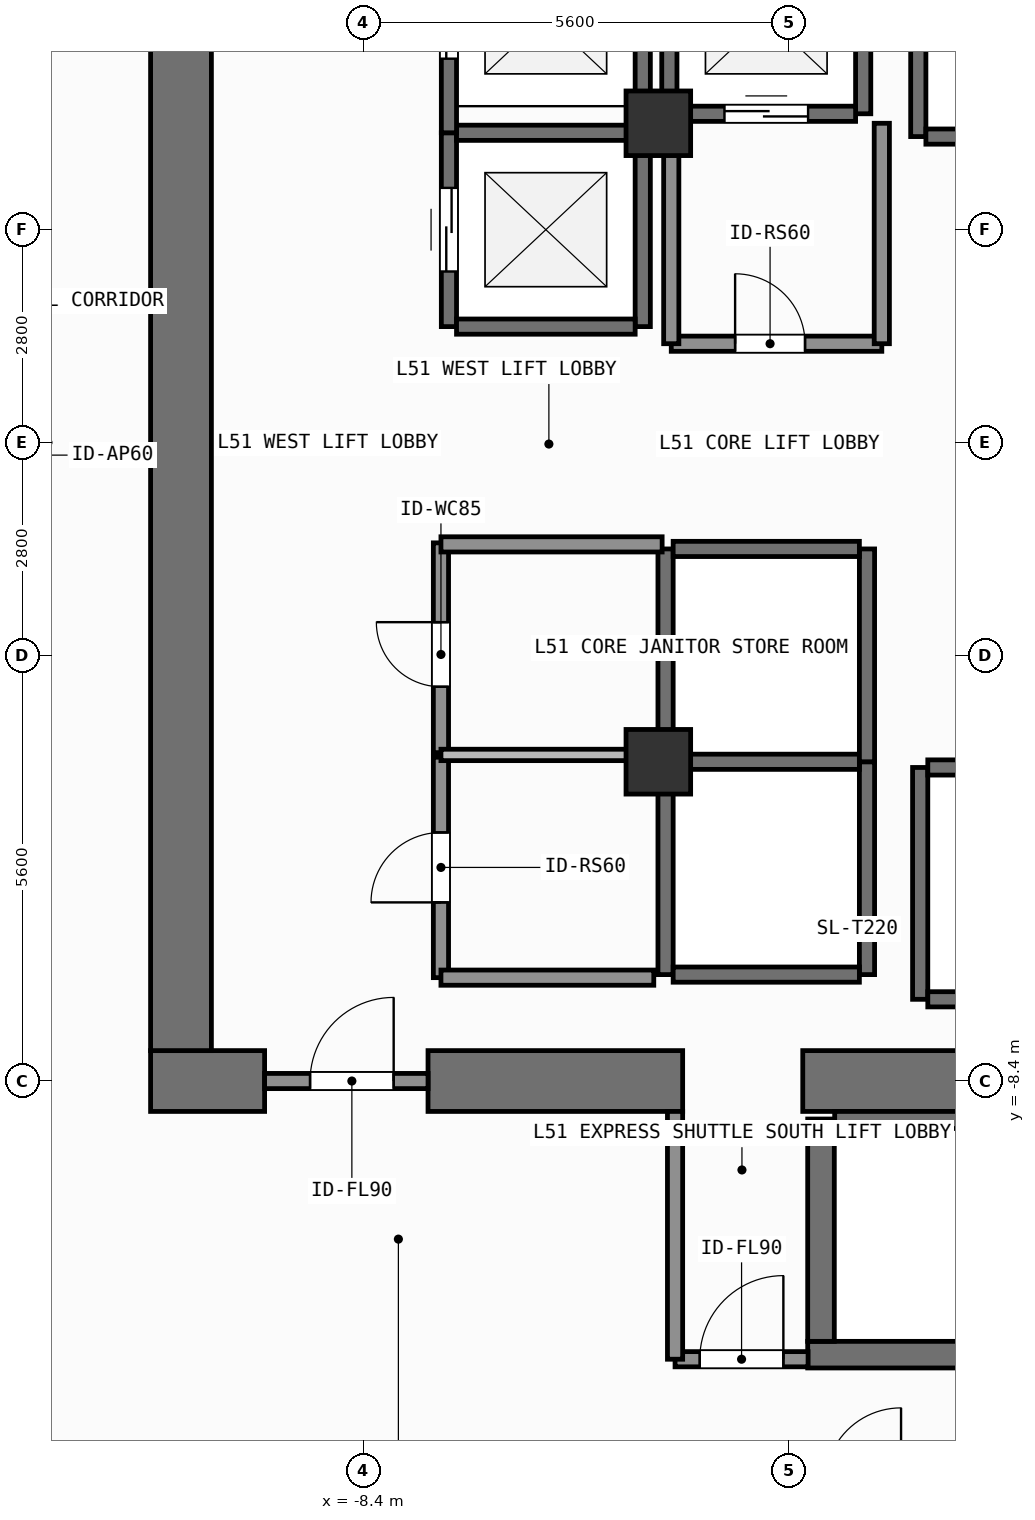
"""IFC4 building model, lengths in metres.
Left out: names, types, materials, properties, quantities, classifications, styles, units other than length and angle.
Written with IfcOpenShell. Run it as: python <this file> out.ifc"""

import sys

from ifc_helpers import new_model, si_unit, direction, frame, frame_2d, origin, origin_2d, place, context, subcontext, project, spatial, rectangle, extrude, element, fill, save


model = new_model("IFC4")
c1 = context("Model", 3, precision=1e-05, world=origin(), true_north=direction((0.0, 1.0)))
c2 = subcontext(c1, "Body", "Model", "MODEL_VIEW")
j1 = project(units=[si_unit("LENGTHUNIT", "METRE"), si_unit("PLANEANGLEUNIT", "RADIAN")], contexts=[c1])
p1 = place(None, origin())
s1 = spatial("IfcSite", under=j1, at=p1, CompositionType="ELEMENT")
p2 = place(p1, origin())
s2 = spatial("IfcBuilding", under=s1, at=p2, CompositionType="ELEMENT")
p3 = place(p2, frame((0.0, 0.0, 207.0)))
s3 = spatial("IfcBuildingStorey", under=s2, at=p3, CompositionType="ELEMENT", Elevation=207.0)
p4 = place(p3, frame((-11.2, -8.4, 0.0), z_axis=(0.0, 0.0, 1.0), x_axis=(1.0, 0.0, 0.0)))
e1 = element("IfcWall", 1, at=p4, inside=s3, PredefinedType="SHEAR", context=c2, shape_type="SweptSolid", body=[
    extrude(rectangle(XDim=1.5, YDim=0.8, at=frame_2d((0.75, 0.0))), origin(), (0.0, 0.0, 1.0), 3.9),
])
p5 = place(p3, frame((-7.55, -8.4, 0.0), z_axis=(0.0, 0.0, 1.0), x_axis=(1.0, 0.0, 0.0)))
e2 = element("IfcWall", 2, at=p5, inside=s3, PredefinedType="SHEAR", context=c2, shape_type="SweptSolid", body=[
    extrude(rectangle(XDim=3.35, YDim=0.8, at=frame_2d((1.675, 0.0))), origin(), (0.0, 0.0, 1.0), 3.9),
])
p6 = place(p3, frame((-2.62, -8.4, 0.0), z_axis=(0.0, 0.0, 1.0), x_axis=(1.0, 0.0, 0.0)))
e3 = element("IfcWall", 3, at=p6, inside=s3, PredefinedType="SHEAR", context=c2, shape_type="SweptSolid", body=[
    extrude(rectangle(XDim=7.27, YDim=0.8, at=frame_2d((3.635, 0.0))), origin(), (0.0, 0.0, 1.0), 3.9),
])
p7 = place(p3, frame((-10.8, -8.0, 0.0), z_axis=(0.0, 0.0, 1.0), x_axis=(0.0, 1.0, 0.0)))
e4 = element("IfcWall", 4, at=p7, inside=s3, PredefinedType="SHEAR", context=c2, shape_type="SweptSolid", body=[
    extrude(rectangle(XDim=16.0, YDim=0.8, at=frame_2d((8.0, 0.0))), origin(), (0.0, 0.0, 1.0), 3.9),
])
p8 = place(p3, frame((-2.555, -12.0, 0.0), z_axis=(0.0, 0.0, 1.0), x_axis=(1.0, 0.0, 0.0)))
e5 = element("IfcWall", 5, at=p8, inside=s3, PredefinedType="SHEAR", context=c2, shape_type="SweptSolid", body=[
    extrude(rectangle(XDim=7.31, YDim=0.35, at=frame_2d((3.655, 0.0))), origin(), (0.0, 0.0, 1.0), 3.9),
])
p9 = place(p3, frame((-2.2, -8.913, 0.0), z_axis=(0.0, 0.0, 1.0), x_axis=(1.0, 0.0, 0.0)))
e6 = element("IfcWall", 6, at=p9, inside=s3, PredefinedType="SHEAR", context=c2, shape_type="SweptSolid", body=[
    extrude(rectangle(XDim=6.6, YDim=0.225, at=frame_2d((3.3, 0.0))), origin(), (0.0, 0.0, 1.0), 3.9),
])
p10 = place(p3, frame((-2.38, -11.825, 0.0), z_axis=(0.0, 0.0, 1.0), x_axis=(0.0, 1.0, 0.0)))
e7 = element("IfcWall", 7, at=p10, inside=s3, PredefinedType="SHEAR", context=c2, shape_type="SweptSolid", body=[
    extrude(rectangle(XDim=2.925, YDim=0.35, at=frame_2d((1.462, 0.0))), origin(), (0.0, 0.0, 1.0), 3.9),
])
for number, where, z_axis, x_axis in (
    (8, (-4.52, -4.2, 0.0), (0.0, 0.0, 1.0), (1.0, 0.0, 0.0)),
    (9, (-4.52, 4.2, 0.0), (0.0, 0.0, 1.0), (1.0, 0.0, 0.0)),
):
    element("IfcColumn", number, at=place(p3, frame(where, z_axis=z_axis, x_axis=x_axis)), inside=s3, PredefinedType="COLUMN", context=c2, shape_type="SweptSolid", body=[
        extrude(rectangle(XDim=0.85, YDim=0.85, at=origin_2d()), origin(), (0.0, 0.0, 1.0), 3.9),
    ])
p11 = place(p3, frame((-7.275, 1.525, 0.0), z_axis=(0.0, 0.0, 1.0), x_axis=(0.0, 1.0, 0.0)))
e10 = element("IfcWall", 10, at=p11, inside=s3, PredefinedType="SHEAR", context=c2, shape_type="SweptSolid", body=[
    extrude(rectangle(XDim=2.55, YDim=0.2, at=frame_2d((1.275, 0.0))), origin(), (0.0, 0.0, 1.0), 3.62),
])
p12 = place(p11, frame((0.725, 0.0, 0.0)))
e11 = element("IfcOpeningElement", 11, at=p12, cuts=e10, PredefinedType="OPENING", context=c2, shape_type="SweptSolid", body=[
    extrude(rectangle(XDim=1.1, YDim=2.2, at=frame_2d((0.55, 1.1))), frame((0.0, 0.11, 0.0), z_axis=(0.0, -1.0, 0.0), x_axis=(1.0, 0.0, 0.0)), (0.0, 0.0, 1.0), 0.22),
])
p13 = place(p3, frame((-4.725, 1.525, 0.0), z_axis=(0.0, 0.0, 1.0), x_axis=(0.0, 1.0, 0.0)))
e12 = element("IfcWall", 12, at=p13, inside=s3, PredefinedType="SHEAR", context=c2, shape_type="SweptSolid", body=[
    extrude(rectangle(XDim=2.55, YDim=0.2, at=frame_2d((1.275, 0.0))), origin(), (0.0, 0.0, 1.0), 3.62),
])
for number, where, z_axis, x_axis in (
    (13, (-7.175, 1.525, 0.0), (0.0, 0.0, 1.0), (1.0, 0.0, 0.0)),
    (14, (-7.175, 4.075, 0.0), (0.0, 0.0, 1.0), (1.0, 0.0, 0.0)),
):
    element("IfcWall", number, at=place(p3, frame(where, z_axis=z_axis, x_axis=x_axis)), inside=s3, PredefinedType="SHEAR", context=c2, shape_type="SweptSolid", body=[
        extrude(rectangle(XDim=2.35, YDim=0.2, at=frame_2d((1.175, 0.0))), origin(), (0.0, 0.0, 1.0), 3.62),
    ])
p14 = place(p3, frame((-7.275, 4.075, 0.0), z_axis=(0.0, 0.0, 1.0), x_axis=(0.0, 1.0, 0.0)))
e15 = element("IfcWall", 15, at=p14, inside=s3, PredefinedType="SHEAR", context=c2, shape_type="SweptSolid", body=[
    extrude(rectangle(XDim=2.8, YDim=0.2, at=frame_2d((1.4, 0.0))), origin(), (0.0, 0.0, 1.0), 3.62),
])
p15 = place(p14, frame((0.975, 0.0, 0.0)))
e16 = element("IfcOpeningElement", 16, at=p15, cuts=e15, PredefinedType="OPENING", context=c2, shape_type="SweptSolid", body=[
    extrude(rectangle(XDim=1.1, YDim=2.2, at=frame_2d((0.55, 1.1))), frame((0.0, 0.11, 0.0), z_axis=(0.0, -1.0, 0.0), x_axis=(1.0, 0.0, 0.0)), (0.0, 0.0, 1.0), 0.22),
])
p16 = place(p3, frame((-4.725, 4.075, 0.0), z_axis=(0.0, 0.0, 1.0), x_axis=(0.0, 1.0, 0.0)))
e17 = element("IfcWall", 17, at=p16, inside=s3, PredefinedType="SHEAR", context=c2, shape_type="SweptSolid", body=[
    extrude(rectangle(XDim=2.8, YDim=0.2, at=frame_2d((1.4, 0.0))), origin(), (0.0, 0.0, 1.0), 3.62),
])
for number, where, z_axis, x_axis in (
    (18, (-4.375, 4.325, 0.0), (0.0, 0.0, 1.0), (0.0, 1.0, 0.0)),
    (19, (-1.825, 4.325, 0.0), (0.0, 0.0, 1.0), (0.0, 1.0, 0.0)),
):
    element("IfcWall", number, at=place(p3, frame(where, z_axis=z_axis, x_axis=x_axis)), inside=s3, PredefinedType="SHEAR", context=c2, shape_type="SweptSolid", body=[
        extrude(rectangle(XDim=2.55, YDim=0.2, at=frame_2d((1.275, 0.0))), origin(), (0.0, 0.0, 1.0), 3.62),
    ])
p17 = place(p3, frame((-4.275, 4.325, 0.0), z_axis=(0.0, 0.0, 1.0), x_axis=(1.0, 0.0, 0.0)))
e20 = element("IfcWall", 20, at=p17, inside=s3, PredefinedType="SHEAR", context=c2, shape_type="SweptSolid", body=[
    extrude(rectangle(XDim=2.35, YDim=0.2, at=frame_2d((1.175, 0.0))), origin(), (0.0, 0.0, 1.0), 3.62),
])
p18 = place(p17, frame((0.625, 0.0, 0.0)))
e21 = element("IfcOpeningElement", 21, at=p18, cuts=e20, PredefinedType="OPENING", context=c2, shape_type="SweptSolid", body=[
    extrude(rectangle(XDim=1.1, YDim=2.2, at=frame_2d((0.55, 1.1))), frame((0.0, 0.11, 0.0), z_axis=(0.0, -1.0, 0.0), x_axis=(1.0, 0.0, 0.0)), (0.0, 0.0, 1.0), 0.22),
])
for number, where, z_axis, x_axis in (
    (22, (-4.425, -7.0, 0.0), (0.0, 0.0, 1.0), (0.0, 1.0, 0.0)),
    (23, (-1.775, -7.0, 0.0), (0.0, 0.0, 1.0), (0.0, 1.0, 0.0)),
):
    element("IfcWall", number, at=place(p3, frame(where, z_axis=z_axis, x_axis=x_axis)), inside=s3, PredefinedType="SHEAR", context=c2, shape_type="SweptSolid", body=[
        extrude(rectangle(XDim=2.8, YDim=0.2, at=frame_2d((1.4, 0.0))), origin(), (0.0, 0.0, 1.0), 3.62),
    ])
for number, where, z_axis, x_axis in (
    (24, (-4.325, -7.0, 0.0), (0.0, 0.0, 1.0), (1.0, 0.0, 0.0)),
    (25, (-4.325, -4.2, 0.0), (0.0, 0.0, 1.0), (1.0, 0.0, 0.0)),
):
    element("IfcWall", number, at=place(p3, frame(where, z_axis=z_axis, x_axis=x_axis)), inside=s3, PredefinedType="SHEAR", context=c2, shape_type="SweptSolid", body=[
        extrude(rectangle(XDim=2.45, YDim=0.2, at=frame_2d((1.225, 0.0))), origin(), (0.0, 0.0, 1.0), 3.62),
    ])
for number, where, z_axis, x_axis in (
    (26, (-4.425, -4.2, 0.0), (0.0, 0.0, 1.0), (0.0, 1.0, 0.0)),
    (27, (-1.775, -4.2, 0.0), (0.0, 0.0, 1.0), (0.0, 1.0, 0.0)),
):
    element("IfcWall", number, at=place(p3, frame(where, z_axis=z_axis, x_axis=x_axis)), inside=s3, PredefinedType="SHEAR", context=c2, shape_type="SweptSolid", body=[
        extrude(rectangle(XDim=2.8, YDim=0.2, at=frame_2d((1.4, 0.0))), origin(), (0.0, 0.0, 1.0), 3.62),
    ])
p19 = place(p3, frame((-4.325, -1.4, 0.0), z_axis=(0.0, 0.0, 1.0), x_axis=(1.0, 0.0, 0.0)))
e28 = element("IfcWall", 28, at=p19, inside=s3, PredefinedType="SHEAR", context=c2, shape_type="SweptSolid", body=[
    extrude(rectangle(XDim=2.45, YDim=0.2, at=frame_2d((1.225, 0.0))), origin(), (0.0, 0.0, 1.0), 3.62),
])
p20 = place(p3, frame((-1.1, 4.025, 0.0), z_axis=(0.0, 0.0, 1.0), x_axis=(0.0, 1.0, 0.0)))
e29 = element("IfcWall", 29, at=p20, inside=s3, PredefinedType="SHEAR", context=c2, shape_type="SweptSolid", body=[
    extrude(rectangle(XDim=3.15, YDim=0.2, at=frame_2d((1.575, 0.0))), origin(), (0.0, 0.0, 1.0), 3.62),
])
p21 = place(p3, frame((-1.0, 4.025, 0.0), z_axis=(0.0, 0.0, 1.0), x_axis=(1.0, 0.0, 0.0)))
e30 = element("IfcWall", 30, at=p21, inside=s3, PredefinedType="SHEAR", context=c2, shape_type="SweptSolid", body=[
    extrude(rectangle(XDim=2.4, YDim=0.2, at=frame_2d((1.2, 0.0))), origin(), (0.0, 0.0, 1.0), 3.62),
])
p22 = place(p3, frame((-1.075, -7.325, 0.0), z_axis=(0.0, 0.0, 1.0), x_axis=(0.0, 1.0, 0.0)))
e31 = element("IfcWall", 31, at=p22, inside=s3, PredefinedType="SHEAR", context=c2, shape_type="SweptSolid", body=[
    extrude(rectangle(XDim=3.05, YDim=0.2, at=frame_2d((1.525, 0.0))), origin(), (0.0, 0.0, 1.0), 3.62),
])
for number, where, z_axis, x_axis in (
    (32, (-0.975, -7.325, 0.0), (0.0, 0.0, 1.0), (1.0, 0.0, 0.0)),
    (33, (-0.975, -4.275, 0.0), (0.0, 0.0, 1.0), (1.0, 0.0, 0.0)),
):
    element("IfcWall", number, at=place(p3, frame(where, z_axis=z_axis, x_axis=x_axis)), inside=s3, PredefinedType="SHEAR", context=c2, shape_type="SweptSolid", body=[
        extrude(rectangle(XDim=2.35, YDim=0.2, at=frame_2d((1.175, 0.0))), origin(), (0.0, 0.0, 1.0), 3.62),
    ])
p23 = place(p3, frame((-9.7, -8.4, 0.0), z_axis=(0.0, 0.0, 1.0), x_axis=(1.0, 0.0, 0.0)))
e34 = element("IfcWall", 34, at=p23, inside=s3, PredefinedType="SOLIDWALL", context=c2, shape_type="SweptSolid", body=[
    extrude(rectangle(XDim=2.15, YDim=0.2, at=frame_2d((1.075, 0.0))), origin(), (0.0, 0.0, 1.0), 2.76),
])
p24 = place(p23, frame((0.598, 0.0, 0.0)))
e35 = element("IfcOpeningElement", 35, at=p24, cuts=e34, PredefinedType="OPENING", context=c2, shape_type="SweptSolid", body=[
    extrude(rectangle(XDim=1.1, YDim=2.15, at=frame_2d((0.55, 1.075))), frame((0.0, 0.11, 0.0), z_axis=(0.0, -1.0, 0.0), x_axis=(1.0, 0.0, 0.0)), (0.0, 0.0, 1.0), 0.22),
])
p25 = place(p3, frame((-4.3, -12.06, 0.0), z_axis=(0.0, 0.0, 1.0), x_axis=(1.0, 0.0, 0.0)))
e36 = element("IfcWall", 36, at=p25, inside=s3, PredefinedType="SOLIDWALL", context=c2, shape_type="SweptSolid", body=[
    extrude(rectangle(XDim=1.75, YDim=0.2, at=frame_2d((0.875, 0.0))), origin(), (0.0, 0.0, 1.0), 3.62),
])
p26 = place(p25, frame((0.325, 0.0, 0.0)))
e37 = element("IfcOpeningElement", 37, at=p26, cuts=e36, PredefinedType="OPENING", context=c2, shape_type="SweptSolid", body=[
    extrude(rectangle(XDim=1.1, YDim=2.15, at=frame_2d((0.55, 1.075))), frame((0.0, 0.11, 0.0), z_axis=(0.0, -1.0, 0.0), x_axis=(1.0, 0.0, 0.0)), (0.0, 0.0, 1.0), 0.22),
])
p27 = place(p3, frame((-7.38, -7.04, 0.0), z_axis=(0.0, 0.0, 1.0), x_axis=(0.0, 1.0, 0.0)))
e38 = element("IfcWall", 38, at=p27, inside=s3, PredefinedType="SOLIDWALL", context=c2, shape_type="SweptSolid", body=[
    extrude(rectangle(XDim=2.9, YDim=0.2, at=frame_2d((1.45, 0.0))), origin(), (0.0, 0.0, 1.0), 3.62),
])
p28 = place(p27, frame((0.99, 0.0, 0.0)))
e39 = element("IfcOpeningElement", 39, at=p28, cuts=e38, PredefinedType="OPENING", context=c2, shape_type="SweptSolid", body=[
    extrude(rectangle(XDim=0.92, YDim=2.1, at=frame_2d((0.46, 1.05))), frame((0.0, 0.11, 0.0), z_axis=(0.0, -1.0, 0.0), x_axis=(1.0, 0.0, 0.0)), (0.0, 0.0, 1.0), 0.22),
])
p29 = place(p3, frame((-7.38, -4.08, 0.0), z_axis=(0.0, 0.0, 1.0), x_axis=(0.0, 1.0, 0.0)))
e40 = element("IfcWall", 40, at=p29, inside=s3, PredefinedType="SOLIDWALL", context=c2, shape_type="SweptSolid", body=[
    extrude(rectangle(XDim=2.76, YDim=0.2, at=frame_2d((1.38, 0.0))), origin(), (0.0, 0.0, 1.0), 3.62),
])
p30 = place(p29, frame((0.867, 0.0, 0.0)))
e41 = element("IfcOpeningElement", 41, at=p30, cuts=e40, PredefinedType="OPENING", context=c2, shape_type="SweptSolid", body=[
    extrude(rectangle(XDim=0.85, YDim=2.1, at=frame_2d((0.425, 1.05))), frame((0.0, 0.11, 0.0), z_axis=(0.0, -1.0, 0.0), x_axis=(1.0, 0.0, 0.0)), (0.0, 0.0, 1.0), 0.22),
])
p31 = place(p3, frame((-4.35, 1.3, 0.0), z_axis=(0.0, 0.0, 1.0), x_axis=(1.0, 0.0, 0.0)))
e42 = element("IfcWall", 42, at=p31, inside=s3, PredefinedType="SOLIDWALL", context=c2, shape_type="SweptSolid", body=[
    extrude(rectangle(XDim=2.77, YDim=0.2, at=frame_2d((1.385, 0.0))), origin(), (0.0, 0.0, 1.0), 3.62),
])
p32 = place(p31, frame((0.84, 0.0, 0.0)))
e43 = element("IfcOpeningElement", 43, at=p32, cuts=e42, PredefinedType="OPENING", context=c2, shape_type="SweptSolid", body=[
    extrude(rectangle(XDim=0.92, YDim=2.1, at=frame_2d((0.46, 1.05))), frame((0.0, 0.11, 0.0), z_axis=(0.0, -1.0, 0.0), x_axis=(1.0, 0.0, 0.0)), (0.0, 0.0, 1.0), 0.22),
])
p33 = place(p3, frame((-4.3, -12.06, 0.0), z_axis=(0.0, 0.0, 1.0), x_axis=(0.0, 1.0, 0.0)))
e44 = element("IfcWall", 44, at=p33, inside=s3, PredefinedType="SOLIDWALL", context=c2, shape_type="SweptSolid", body=[
    extrude(rectangle(XDim=3.26, YDim=0.2, at=frame_2d((1.63, 0.0))), origin(), (0.0, 0.0, 1.0), 3.62),
])
p34 = place(p3, frame((-7.38, -1.34, 0.0), z_axis=(0.0, 0.0, 1.0), x_axis=(1.0, 0.0, 0.0)))
e45 = element("IfcWall", 45, at=p34, inside=s3, PredefinedType="SOLIDWALL", context=c2, shape_type="SweptSolid", body=[
    extrude(rectangle(XDim=2.91, YDim=0.2, at=frame_2d((1.455, 0.0))), origin(), (0.0, 0.0, 1.0), 3.62),
])
p35 = place(p3, frame((-7.38, -7.04, 0.0), z_axis=(0.0, 0.0, 1.0), x_axis=(1.0, 0.0, 0.0)))
e46 = element("IfcWall", 46, at=p35, inside=s3, PredefinedType="SOLIDWALL", context=c2, shape_type="SweptSolid", body=[
    extrude(rectangle(XDim=2.8, YDim=0.2, at=frame_2d((1.4, 0.0))), origin(), (0.0, 0.0, 1.0), 3.62),
])
p36 = place(p3, frame((-7.38, -4.11, 0.0), z_axis=(0.0, 0.0, 1.0), x_axis=(1.0, 0.0, 0.0)))
e47 = element("IfcWall", 47, at=p36, inside=s3, PredefinedType="PARTITIONING", context=c2, shape_type="SweptSolid", body=[
    extrude(rectangle(XDim=2.8, YDim=0.15, at=frame_2d((1.4, 0.0))), origin(), (0.0, 0.0, 1.0), 3.62),
])
for number, where, z_axis, x_axis in (
    (48, (-4.35, 1.3, 0.0), (0.0, 0.0, 1.0), (0.0, 1.0, 0.0)),
    (49, (-1.58, 1.3, 0.0), (0.0, 0.0, 1.0), (0.0, 1.0, 0.0)),
):
    element("IfcWall", number, at=place(p3, frame(where, z_axis=z_axis, x_axis=x_axis)), inside=s3, PredefinedType="SOLIDWALL", context=c2, shape_type="SweptSolid", body=[
        extrude(rectangle(XDim=2.9, YDim=0.2, at=frame_2d((1.45, 0.0))), origin(), (0.0, 0.0, 1.0), 3.62),
    ])
p37 = place(p12, origin())
e50 = element("IfcDoor", 50, at=p37, inside=s3, OperationType="SLIDING_TO_LEFT", PredefinedType="DOOR", context=c2, shape_type="SweptSolid", body=[
    extrude(rectangle(XDim=1.1, YDim=2.2, at=frame_2d((0.55, 1.1))), frame((0.0, 0.025, 0.0), z_axis=(0.0, -1.0, 0.0), x_axis=(1.0, 0.0, 0.0)), (0.0, 0.0, 1.0), 0.05),
])
fill(e11, e50)
p38 = place(p15, origin())
e51 = element("IfcDoor", 51, at=p38, inside=s3, OperationType="SLIDING_TO_LEFT", PredefinedType="DOOR", context=c2, shape_type="SweptSolid", body=[
    extrude(rectangle(XDim=1.1, YDim=2.2, at=frame_2d((0.55, 1.1))), frame((0.0, 0.025, 0.0), z_axis=(0.0, -1.0, 0.0), x_axis=(1.0, 0.0, 0.0)), (0.0, 0.0, 1.0), 0.05),
])
fill(e16, e51)
p39 = place(p18, origin())
e52 = element("IfcDoor", 52, at=p39, inside=s3, OperationType="SLIDING_TO_LEFT", PredefinedType="DOOR", context=c2, shape_type="SweptSolid", body=[
    extrude(rectangle(XDim=1.1, YDim=2.2, at=frame_2d((0.55, 1.1))), frame((0.0, 0.025, 0.0), z_axis=(0.0, -1.0, 0.0), x_axis=(1.0, 0.0, 0.0)), (0.0, 0.0, 1.0), 0.05),
])
fill(e21, e52)
p40 = place(p24, origin())
e53 = element("IfcDoor", 53, at=p40, inside=s3, OperationType="SINGLE_SWING_RIGHT", PredefinedType="DOOR", context=c2, shape_type="SweptSolid", body=[
    extrude(rectangle(XDim=1.1, YDim=2.15, at=frame_2d((0.55, 1.075))), frame((0.0, 0.025, 0.0), z_axis=(0.0, -1.0, 0.0), x_axis=(1.0, 0.0, 0.0)), (0.0, 0.0, 1.0), 0.05),
])
fill(e35, e53)
p41 = place(p26, origin())
e54 = element("IfcDoor", 54, at=p41, inside=s3, OperationType="SINGLE_SWING_RIGHT", PredefinedType="DOOR", context=c2, shape_type="SweptSolid", body=[
    extrude(rectangle(XDim=1.1, YDim=2.15, at=frame_2d((0.55, 1.075))), frame((0.0, 0.025, 0.0), z_axis=(0.0, -1.0, 0.0), x_axis=(1.0, 0.0, 0.0)), (0.0, 0.0, 1.0), 0.05),
])
fill(e37, e54)
p42 = place(p28, origin())
e55 = element("IfcDoor", 55, at=p42, inside=s3, OperationType="SINGLE_SWING_LEFT", PredefinedType="DOOR", context=c2, shape_type="SweptSolid", body=[
    extrude(rectangle(XDim=0.92, YDim=2.1, at=frame_2d((0.46, 1.05))), frame((0.0, 0.025, 0.0), z_axis=(0.0, -1.0, 0.0), x_axis=(1.0, 0.0, 0.0)), (0.0, 0.0, 1.0), 0.05),
])
fill(e39, e55)
p43 = place(p30, origin())
e56 = element("IfcDoor", 56, at=p43, inside=s3, OperationType="SINGLE_SWING_RIGHT", PredefinedType="DOOR", context=c2, shape_type="SweptSolid", body=[
    extrude(rectangle(XDim=0.85, YDim=2.1, at=frame_2d((0.425, 1.05))), frame((0.0, 0.025, 0.0), z_axis=(0.0, -1.0, 0.0), x_axis=(1.0, 0.0, 0.0)), (0.0, 0.0, 1.0), 0.05),
])
fill(e41, e56)
p44 = place(p32, origin())
e57 = element("IfcDoor", 57, at=p44, inside=s3, OperationType="SINGLE_SWING_LEFT", PredefinedType="DOOR", context=c2, shape_type="SweptSolid", body=[
    extrude(rectangle(XDim=0.92, YDim=2.1, at=frame_2d((0.46, 1.05))), frame((0.0, 0.025, 0.0), z_axis=(0.0, -1.0, 0.0), x_axis=(1.0, 0.0, 0.0)), (0.0, 0.0, 1.0), 0.05),
])
fill(e43, e57)
save(model, sys.argv[1])
